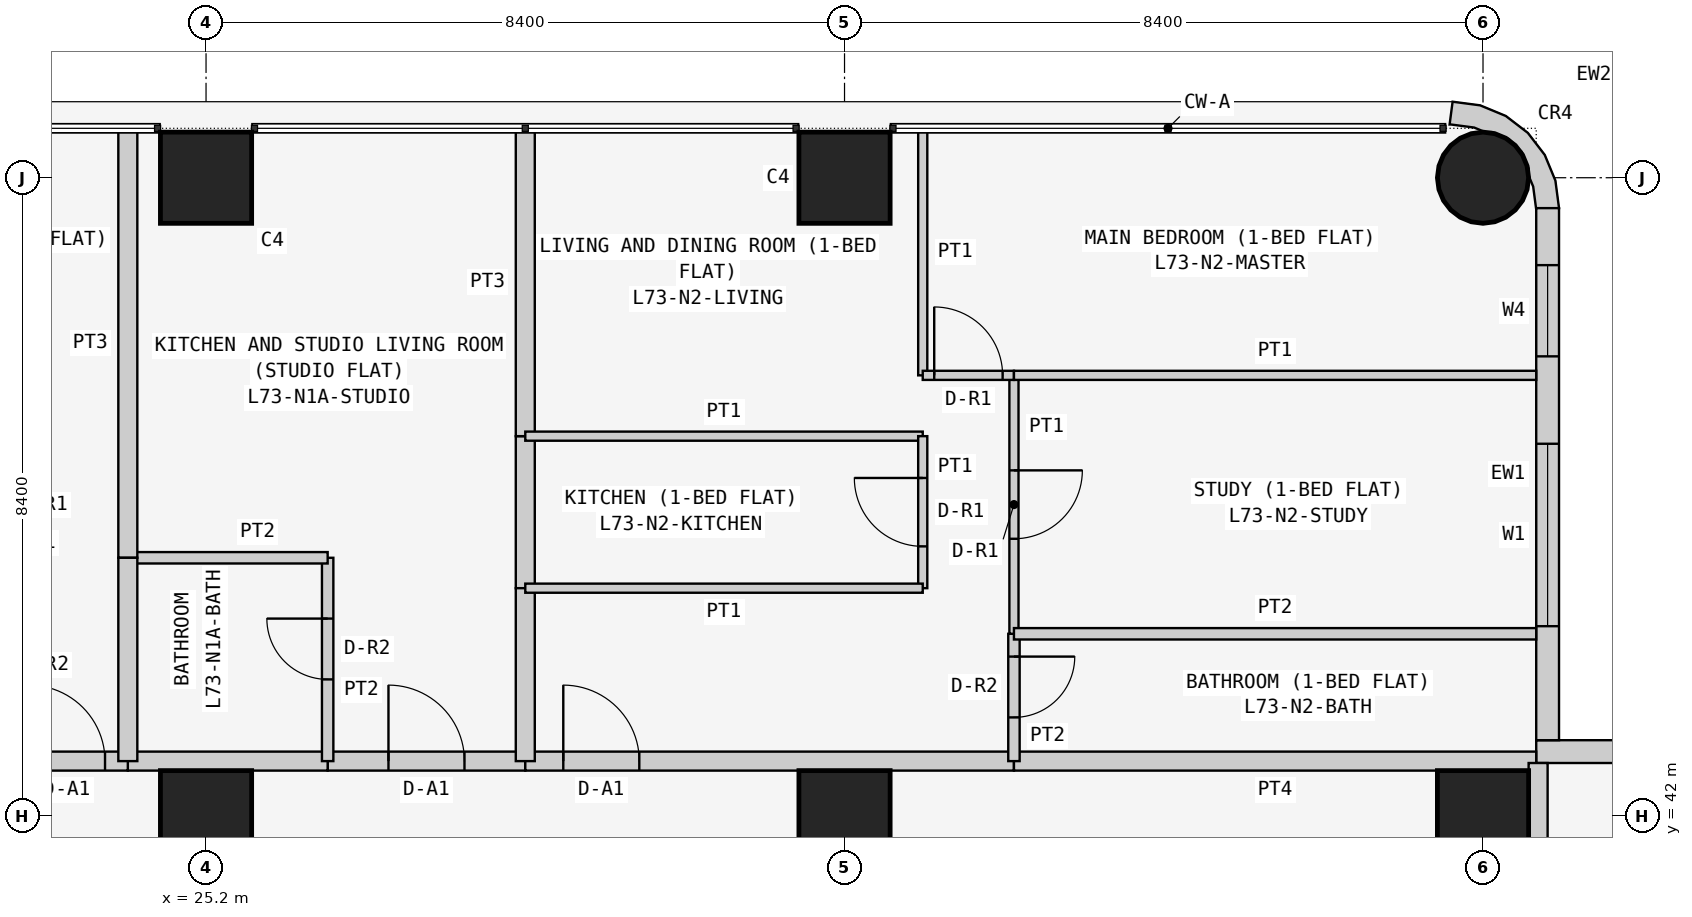
"""IFC4 building model, lengths in metres.
Left out: names, types, materials, properties, quantities, classifications, styles, units other than length and angle.
Written with IfcOpenShell. Run it as: python <this file> out.ifc"""

import sys

from ifc_helpers import new_model, si_unit, direction, frame, frame_2d, origin, origin_2d, place, context, subcontext, project, spatial, polyline, rectangle, circle, outline, extrude, element, fill, save


model = new_model("IFC4")
c1 = context("Model", 3, precision=1e-05, world=origin(), true_north=direction((0.0, 1.0)))
c2 = subcontext(c1, "Body", "Model", "MODEL_VIEW")
j1 = project(units=[si_unit("LENGTHUNIT", "METRE"), si_unit("PLANEANGLEUNIT", "RADIAN")], contexts=[c1])
p1 = place(None, origin())
s1 = spatial("IfcSite", under=j1, at=p1, CompositionType="ELEMENT")
p2 = place(p1, origin())
s2 = spatial("IfcBuilding", under=s1, at=p2, CompositionType="ELEMENT")
p3 = place(p2, frame((0.0, 0.0, 279.3)))
s3 = spatial("IfcBuildingStorey", under=s2, at=p3, CompositionType="ELEMENT", Elevation=279.3)
for number, where, z_axis, x_axis in (
    (1, (25.2, 42.0, 0.0), (0.0, 0.0, 1.0), (1.0, 0.0, 0.0)),
    (2, (25.2, 50.4, 0.0), (0.0, 0.0, 1.0), (1.0, 0.0, 0.0)),
    (3, (33.6, 42.0, 0.0), (0.0, 0.0, 1.0), (1.0, 0.0, 0.0)),
    (4, (33.6, 50.4, 0.0), (0.0, 0.0, 1.0), (1.0, 0.0, 0.0)),
    (5, (42.0, 42.0, 0.0), (0.0, 0.0, 1.0), (1.0, 0.0, 0.0)),
):
    element("IfcColumn", number, at=place(p3, frame(where, z_axis=z_axis, x_axis=x_axis)), inside=s3, PredefinedType="COLUMN", context=c2, shape_type="SweptSolid", body=[
        extrude(rectangle(XDim=1.2, YDim=1.2, at=origin_2d()), origin(), (0.0, 0.0, 1.0), 3.6),
    ])
p4 = place(p3, frame((42.0, 50.4, 0.0), z_axis=(0.0, 0.0, 1.0), x_axis=(1.0, 0.0, 0.0)))
e6 = element("IfcColumn", 6, at=p4, inside=s3, PredefinedType="COLUMN", context=c2, shape_type="SweptSolid", body=[
    extrude(circle(Radius=0.6, at=origin_2d()), origin(), (0.0, 0.0, 1.0), 3.6),
])
p5 = place(p3, frame((50.0, 42.85, 0.0), z_axis=(0.0, 0.0, 1.0), x_axis=(-1.0, 0.0, 0.0)))
e7 = element("IfcWall", 7, at=p5, inside=s3, PredefinedType="SOLIDWALL", context=c2, shape_type="SweptSolid", body=[
    extrude(rectangle(XDim=7.3, YDim=0.3, at=frame_2d((3.65, 0.0))), origin(), (0.0, 0.0, 1.0), 3.45),
])
p6 = place(p5, frame((3.1, 0.0, 0.9)))
e8 = element("IfcOpeningElement", 8, at=p6, cuts=e7, PredefinedType="OPENING", context=c2, shape_type="SweptSolid", body=[
    extrude(rectangle(XDim=2.4, YDim=1.5, at=frame_2d((1.2, 0.75))), frame((0.0, 0.16, 0.0), z_axis=(0.0, -1.0, 0.0), x_axis=(1.0, 0.0, 0.0)), (0.0, 0.0, 1.0), 0.32),
])
p7 = place(p5, frame((0.75, 0.0, 0.9)))
e9 = element("IfcOpeningElement", 9, at=p7, cuts=e7, PredefinedType="OPENING", context=c2, shape_type="SweptSolid", body=[
    extrude(rectangle(XDim=1.2, YDim=1.5, at=frame_2d((0.6, 0.75))), frame((0.0, 0.16, 0.0), z_axis=(0.0, -1.0, 0.0), x_axis=(1.0, 0.0, 0.0)), (0.0, 0.0, 1.0), 0.32),
])
p8 = place(p3, frame((42.85, 43.0, 0.0), z_axis=(0.0, 0.0, 1.0), x_axis=(0.0, 1.0, 0.0)))
e10 = element("IfcWall", 10, at=p8, inside=s3, PredefinedType="SOLIDWALL", context=c2, shape_type="SweptSolid", body=[
    extrude(rectangle(XDim=7.0, YDim=0.3, at=frame_2d((3.5, 0.0))), origin(), (0.0, 0.0, 1.0), 3.45),
])
p9 = place(p8, frame((1.5, 0.0, 0.9)))
e11 = element("IfcOpeningElement", 11, at=p9, cuts=e10, PredefinedType="OPENING", context=c2, shape_type="SweptSolid", body=[
    extrude(rectangle(XDim=2.4, YDim=1.5, at=frame_2d((1.2, 0.75))), frame((0.0, 0.16, 0.0), z_axis=(0.0, -1.0, 0.0), x_axis=(1.0, 0.0, 0.0)), (0.0, 0.0, 1.0), 0.32),
])
p10 = place(p8, frame((5.05, 0.0, 0.9)))
e12 = element("IfcOpeningElement", 12, at=p10, cuts=e10, PredefinedType="OPENING", context=c2, shape_type="SweptSolid", body=[
    extrude(rectangle(XDim=1.2, YDim=1.5, at=frame_2d((0.6, 0.75))), frame((0.0, 0.16, 0.0), z_axis=(0.0, -1.0, 0.0), x_axis=(1.0, 0.0, 0.0)), (0.0, 0.0, 1.0), 0.32),
])
p11 = place(p3, frame((42.576, 50.038, 0.0), z_axis=(0.0, 0.0, 1.0), x_axis=(0.707106781187, 0.707106781187, 0.0)))
e13 = element("IfcWall", 13, at=p11, inside=s3, PredefinedType="SOLIDWALL", context=c2, shape_type="SweptSolid", body=[
    extrude(outline(polyline([(0.233, 0.114), (0.047, -0.129), (0.033, -0.143), (0.273, -0.327), (0.495, -0.037), (0.635, 0.3), (0.683, 0.663), (0.635, 1.025), (0.495, 1.363), (0.273, 1.653), (0.033, 1.469), (0.047, 1.455), (0.233, 1.212), (0.292, 1.069), (0.358, 1.003), (0.449, 0.782), (0.449, 0.543), (0.358, 0.322), (0.292, 0.257), (0.233, 0.114)])), origin(), (0.0, 0.0, 1.0), 3.45),
])
p12 = place(p3, frame((26.8, 42.725, 0.0), z_axis=(0.0, 0.0, 1.0), x_axis=(1.0, 0.0, 0.0)))
e14 = element("IfcWall", 14, at=p12, inside=s3, PredefinedType="PARTITIONING", context=c2, shape_type="SweptSolid", body=[
    extrude(rectangle(XDim=2.6, YDim=0.25, at=frame_2d((1.3, 0.0))), origin(), (0.0, 0.0, 1.0), 3.45),
])
p13 = place(p12, frame((0.8, 0.0, 0.0)))
e15 = element("IfcOpeningElement", 15, at=p13, cuts=e14, PredefinedType="OPENING", context=c2, shape_type="SweptSolid", body=[
    extrude(rectangle(XDim=1.0, YDim=2.1, at=frame_2d((0.5, 1.05))), frame((0.0, 0.135, 0.0), z_axis=(0.0, -1.0, 0.0), x_axis=(1.0, 0.0, 0.0)), (0.0, 0.0, 1.0), 0.27),
])
p14 = place(p3, frame((24.171, 42.725, 0.0), z_axis=(0.0, 0.0, 1.0), x_axis=(1.0, 0.0, 0.0)))
e16 = element("IfcWall", 16, at=p14, inside=s3, PredefinedType="PARTITIONING", context=c2, shape_type="SweptSolid", body=[
    extrude(rectangle(XDim=2.629, YDim=0.25, at=frame_2d((1.314, 0.0))), origin(), (0.0, 0.0, 1.0), 3.45),
])
p15 = place(p3, frame((22.571, 42.725, 0.0), z_axis=(0.0, 0.0, 1.0), x_axis=(1.0, 0.0, 0.0)))
e17 = element("IfcWall", 17, at=p15, inside=s3, PredefinedType="PARTITIONING", context=c2, shape_type="SweptSolid", body=[
    extrude(rectangle(XDim=1.6, YDim=0.25, at=frame_2d((0.8, 0.0))), origin(), (0.0, 0.0, 1.0), 3.45),
])
p16 = place(p15, frame((0.3, 0.0, 0.0)))
e18 = element("IfcOpeningElement", 18, at=p16, cuts=e17, PredefinedType="OPENING", context=c2, shape_type="SweptSolid", body=[
    extrude(rectangle(XDim=1.0, YDim=2.1, at=frame_2d((0.5, 1.05))), frame((0.0, 0.135, 0.0), z_axis=(0.0, -1.0, 0.0), x_axis=(1.0, 0.0, 0.0)), (0.0, 0.0, 1.0), 0.27),
])
p17 = place(p3, frame((29.4, 42.725, 0.0), z_axis=(0.0, 0.0, 1.0), x_axis=(1.0, 0.0, 0.0)))
e19 = element("IfcWall", 19, at=p17, inside=s3, PredefinedType="PARTITIONING", context=c2, shape_type="SweptSolid", body=[
    extrude(rectangle(XDim=6.429, YDim=0.25, at=frame_2d((3.215, 0.0))), origin(), (0.0, 0.0, 1.0), 3.45),
])
p18 = place(p17, frame((0.5, 0.0, 0.0)))
e20 = element("IfcOpeningElement", 20, at=p18, cuts=e19, PredefinedType="OPENING", context=c2, shape_type="SweptSolid", body=[
    extrude(rectangle(XDim=1.0, YDim=2.1, at=frame_2d((0.5, 1.05))), frame((0.0, 0.135, 0.0), z_axis=(0.0, -1.0, 0.0), x_axis=(1.0, 0.0, 0.0)), (0.0, 0.0, 1.0), 0.27),
])
for number, where, z_axis, x_axis in (
    (21, (35.829, 42.725, 0.0), (0.0, 0.0, 1.0), (1.0, 0.0, 0.0)),
    (22, (42.725, 42.7, 0.0), (0.0, 0.0, 1.0), (0.0, -1.0, 0.0)),
):
    element("IfcWall", number, at=place(p3, frame(where, z_axis=z_axis, x_axis=x_axis)), inside=s3, PredefinedType="PARTITIONING", context=c2, shape_type="SweptSolid", body=[
        extrude(rectangle(XDim=6.871, YDim=0.25, at=frame_2d((3.436, 0.0))), origin(), (0.0, 0.0, 1.0), 3.45),
    ])
p19 = place(p3, frame((26.8, 42.725, 0.0), z_axis=(0.0, 0.0, 1.0), x_axis=(0.0, 1.0, 0.0)))
e23 = element("IfcWall", 23, at=p19, inside=s3, PredefinedType="PARTITIONING", context=c2, shape_type="SweptSolid", body=[
    extrude(rectangle(XDim=2.675, YDim=0.15, at=frame_2d((1.337, 0.0))), origin(), (0.0, 0.0, 1.0), 3.45),
])
p20 = place(p19, frame((1.075, 0.0, 0.0)))
e24 = element("IfcOpeningElement", 24, at=p20, cuts=e23, PredefinedType="OPENING", context=c2, shape_type="SweptSolid", body=[
    extrude(rectangle(XDim=0.8, YDim=2.1, at=frame_2d((0.4, 1.05))), frame((0.0, 0.085, 0.0), z_axis=(0.0, -1.0, 0.0), x_axis=(1.0, 0.0, 0.0)), (0.0, 0.0, 1.0), 0.17),
])
p21 = place(p3, frame((26.8, 45.4, 0.0), z_axis=(0.0, 0.0, 1.0), x_axis=(-1.0, 0.0, 0.0)))
e25 = element("IfcWall", 25, at=p21, inside=s3, PredefinedType="PARTITIONING", context=c2, shape_type="SweptSolid", body=[
    extrude(rectangle(XDim=2.629, YDim=0.15, at=frame_2d((1.314, 0.0))), origin(), (0.0, 0.0, 1.0), 3.45),
])
p22 = place(p3, frame((24.171, 45.4, 0.0), z_axis=(0.0, 0.0, 1.0), x_axis=(0.0, 1.0, 0.0)))
e26 = element("IfcWall", 26, at=p22, inside=s3, PredefinedType="PARTITIONING", context=c2, shape_type="SweptSolid", body=[
    extrude(rectangle(XDim=5.65, YDim=0.25, at=frame_2d((2.825, 0.0))), origin(), (0.0, 0.0, 1.0), 3.45),
])
p23 = place(p3, frame((29.4, 47.0, 0.0), z_axis=(0.0, 0.0, 1.0), x_axis=(0.0, -1.0, 0.0)))
e27 = element("IfcWall", 27, at=p23, inside=s3, PredefinedType="PARTITIONING", context=c2, shape_type="SweptSolid", body=[
    extrude(rectangle(XDim=2.0, YDim=0.25, at=frame_2d((1.0, 0.0))), origin(), (0.0, 0.0, 1.0), 2.848),
])
p24 = place(p3, frame((29.4, 45.0, 0.0), z_axis=(0.0, 0.0, 1.0), x_axis=(0.0, -1.0, 0.0)))
e28 = element("IfcWall", 28, at=p24, inside=s3, PredefinedType="PARTITIONING", context=c2, shape_type="SweptSolid", body=[
    extrude(rectangle(XDim=2.275, YDim=0.25, at=frame_2d((1.137, 0.0))), origin(), (0.0, 0.0, 1.0), 2.848),
])
p25 = place(p3, frame((29.4, 51.05, 0.0), z_axis=(0.0, 0.0, 1.0), x_axis=(0.0, -1.0, 0.0)))
e29 = element("IfcWall", 29, at=p25, inside=s3, PredefinedType="PARTITIONING", context=c2, shape_type="SweptSolid", body=[
    extrude(rectangle(XDim=4.05, YDim=0.25, at=frame_2d((2.025, 0.0))), origin(), (0.0, 0.0, 1.0), 2.848),
])
p26 = place(p3, frame((24.171, 45.4, 0.0), z_axis=(0.0, 0.0, 1.0), x_axis=(0.0, -1.0, 0.0)))
e30 = element("IfcWall", 30, at=p26, inside=s3, PredefinedType="PARTITIONING", context=c2, shape_type="SweptSolid", body=[
    extrude(rectangle(XDim=2.675, YDim=0.25, at=frame_2d((1.337, 0.0))), origin(), (0.0, 0.0, 1.0), 3.45),
])
p27 = place(p3, frame((29.4, 47.0, 0.0), z_axis=(0.0, 0.0, 1.0), x_axis=(1.0, 0.0, 0.0)))
e31 = element("IfcWall", 31, at=p27, inside=s3, PredefinedType="PARTITIONING", context=c2, shape_type="SweptSolid", body=[
    extrude(rectangle(XDim=5.229, YDim=0.12, at=frame_2d((2.615, 0.0))), origin(), (0.0, 0.0, 1.0), 3.45),
])
p28 = place(p3, frame((34.629, 47.0, 0.0), z_axis=(0.0, 0.0, 1.0), x_axis=(0.0, -1.0, 0.0)))
e32 = element("IfcWall", 32, at=p28, inside=s3, PredefinedType="PARTITIONING", context=c2, shape_type="SweptSolid", body=[
    extrude(rectangle(XDim=2.0, YDim=0.12, at=frame_2d((1.0, 0.0))), origin(), (0.0, 0.0, 1.0), 3.45),
])
p29 = place(p28, frame((0.55, 0.0, 0.0)))
e33 = element("IfcOpeningElement", 33, at=p29, cuts=e32, PredefinedType="OPENING", context=c2, shape_type="SweptSolid", body=[
    extrude(rectangle(XDim=0.9, YDim=2.1, at=frame_2d((0.45, 1.05))), frame((0.0, 0.07, 0.0), z_axis=(0.0, -1.0, 0.0), x_axis=(1.0, 0.0, 0.0)), (0.0, 0.0, 1.0), 0.14),
])
p30 = place(p3, frame((34.629, 45.0, 0.0), z_axis=(0.0, 0.0, 1.0), x_axis=(-1.0, 0.0, 0.0)))
e34 = element("IfcWall", 34, at=p30, inside=s3, PredefinedType="PARTITIONING", context=c2, shape_type="SweptSolid", body=[
    extrude(rectangle(XDim=5.229, YDim=0.12, at=frame_2d((2.615, 0.0))), origin(), (0.0, 0.0, 1.0), 3.45),
])
p31 = place(p3, frame((35.829, 44.4, 0.0), z_axis=(0.0, 0.0, 1.0), x_axis=(0.0, -1.0, 0.0)))
e35 = element("IfcWall", 35, at=p31, inside=s3, PredefinedType="PARTITIONING", context=c2, shape_type="SweptSolid", body=[
    extrude(rectangle(XDim=1.675, YDim=0.15, at=frame_2d((0.837, 0.0))), origin(), (0.0, 0.0, 1.0), 3.45),
])
p32 = place(p31, frame((0.3, 0.0, 0.0)))
e36 = element("IfcOpeningElement", 36, at=p32, cuts=e35, PredefinedType="OPENING", context=c2, shape_type="SweptSolid", body=[
    extrude(rectangle(XDim=0.8, YDim=2.1, at=frame_2d((0.4, 1.05))), frame((0.0, 0.085, 0.0), z_axis=(0.0, -1.0, 0.0), x_axis=(1.0, 0.0, 0.0)), (0.0, 0.0, 1.0), 0.17),
])
p33 = place(p3, frame((35.829, 47.8, 0.0), z_axis=(0.0, 0.0, 1.0), x_axis=(0.0, -1.0, 0.0)))
e37 = element("IfcWall", 37, at=p33, inside=s3, PredefinedType="PARTITIONING", context=c2, shape_type="SweptSolid", body=[
    extrude(rectangle(XDim=3.4, YDim=0.12, at=frame_2d((1.7, 0.0))), origin(), (0.0, 0.0, 1.0), 3.45),
])
p34 = place(p33, frame((1.25, 0.0, 0.0)))
e38 = element("IfcOpeningElement", 38, at=p34, cuts=e37, PredefinedType="OPENING", context=c2, shape_type="SweptSolid", body=[
    extrude(rectangle(XDim=0.9, YDim=2.1, at=frame_2d((0.45, 1.05))), frame((0.0, 0.07, 0.0), z_axis=(0.0, -1.0, 0.0), x_axis=(1.0, 0.0, 0.0)), (0.0, 0.0, 1.0), 0.14),
])
p35 = place(p3, frame((34.629, 51.05, 0.0), z_axis=(0.0, 0.0, 1.0), x_axis=(0.0, -1.0, 0.0)))
e39 = element("IfcWall", 39, at=p35, inside=s3, PredefinedType="PARTITIONING", context=c2, shape_type="SweptSolid", body=[
    extrude(rectangle(XDim=3.25, YDim=0.12, at=frame_2d((1.625, 0.0))), origin(), (0.0, 0.0, 1.0), 3.45),
])
p36 = place(p3, frame((34.629, 47.8, 0.0), z_axis=(0.0, 0.0, 1.0), x_axis=(1.0, 0.0, 0.0)))
e40 = element("IfcWall", 40, at=p36, inside=s3, PredefinedType="PARTITIONING", context=c2, shape_type="SweptSolid", body=[
    extrude(rectangle(XDim=1.2, YDim=0.12, at=frame_2d((0.6, 0.0))), origin(), (0.0, 0.0, 1.0), 3.45),
])
p37 = place(p36, frame((0.151, 0.0, 0.0)))
e41 = element("IfcOpeningElement", 41, at=p37, cuts=e40, PredefinedType="OPENING", context=c2, shape_type="SweptSolid", body=[
    extrude(rectangle(XDim=0.9, YDim=2.1, at=frame_2d((0.45, 1.05))), frame((0.0, 0.07, 0.0), z_axis=(0.0, -1.0, 0.0), x_axis=(1.0, 0.0, 0.0)), (0.0, 0.0, 1.0), 0.14),
])
p38 = place(p3, frame((35.829, 44.4, 0.0), z_axis=(0.0, 0.0, 1.0), x_axis=(1.0, 0.0, 0.0)))
e42 = element("IfcWall", 42, at=p38, inside=s3, PredefinedType="PARTITIONING", context=c2, shape_type="SweptSolid", body=[
    extrude(rectangle(XDim=6.871, YDim=0.15, at=frame_2d((3.436, 0.0))), origin(), (0.0, 0.0, 1.0), 3.45),
])
p39 = place(p3, frame((35.829, 47.8, 0.0), z_axis=(0.0, 0.0, 1.0), x_axis=(1.0, 0.0, 0.0)))
e43 = element("IfcWall", 43, at=p39, inside=s3, PredefinedType="PARTITIONING", context=c2, shape_type="SweptSolid", body=[
    extrude(rectangle(XDim=6.871, YDim=0.12, at=frame_2d((3.436, 0.0))), origin(), (0.0, 0.0, 1.0), 3.45),
])
p40 = place(p9, origin())
e44 = element("IfcWindow", 44, at=p40, inside=s3, PartitioningType="SINGLE_PANEL", PredefinedType="WINDOW", context=c2, shape_type="SweptSolid", body=[
    extrude(rectangle(XDim=2.4, YDim=1.5, at=frame_2d((1.2, 0.75))), frame((0.0, 0.03, 0.0), z_axis=(0.0, -1.0, 0.0), x_axis=(1.0, 0.0, 0.0)), (0.0, 0.0, 1.0), 0.06),
])
fill(e11, e44)
p41 = place(p10, origin())
e45 = element("IfcWindow", 45, at=p41, inside=s3, PartitioningType="SINGLE_PANEL", PredefinedType="WINDOW", context=c2, shape_type="SweptSolid", body=[
    extrude(rectangle(XDim=1.2, YDim=1.5, at=frame_2d((0.6, 0.75))), frame((0.0, 0.03, 0.0), z_axis=(0.0, -1.0, 0.0), x_axis=(1.0, 0.0, 0.0)), (0.0, 0.0, 1.0), 0.06),
])
fill(e12, e45)
p42 = place(p13, origin())
e46 = element("IfcDoor", 46, at=p42, inside=s3, OperationType="SINGLE_SWING_LEFT", PredefinedType="DOOR", context=c2, shape_type="SweptSolid", body=[
    extrude(rectangle(XDim=1.0, YDim=2.1, at=frame_2d((0.5, 1.05))), frame((0.0, 0.025, 0.0), z_axis=(0.0, -1.0, 0.0), x_axis=(1.0, 0.0, 0.0)), (0.0, 0.0, 1.0), 0.05),
])
fill(e15, e46)
p43 = place(p20, origin())
e47 = element("IfcDoor", 47, at=p43, inside=s3, OperationType="SINGLE_SWING_RIGHT", PredefinedType="DOOR", context=c2, shape_type="SweptSolid", body=[
    extrude(rectangle(XDim=0.8, YDim=2.1, at=frame_2d((0.4, 1.05))), frame((0.0, 0.025, 0.0), z_axis=(0.0, -1.0, 0.0), x_axis=(1.0, 0.0, 0.0)), (0.0, 0.0, 1.0), 0.05),
])
fill(e24, e47)
p44 = place(p16, origin())
e48 = element("IfcDoor", 48, at=p44, inside=s3, OperationType="SINGLE_SWING_LEFT", PredefinedType="DOOR", context=c2, shape_type="SweptSolid", body=[
    extrude(rectangle(XDim=1.0, YDim=2.1, at=frame_2d((0.5, 1.05))), frame((0.0, 0.025, 0.0), z_axis=(0.0, -1.0, 0.0), x_axis=(1.0, 0.0, 0.0)), (0.0, 0.0, 1.0), 0.05),
])
fill(e18, e48)
p45 = place(p18, origin())
e49 = element("IfcDoor", 49, at=p45, inside=s3, OperationType="SINGLE_SWING_LEFT", PredefinedType="DOOR", context=c2, shape_type="SweptSolid", body=[
    extrude(rectangle(XDim=1.0, YDim=2.1, at=frame_2d((0.5, 1.05))), frame((0.0, 0.025, 0.0), z_axis=(0.0, -1.0, 0.0), x_axis=(1.0, 0.0, 0.0)), (0.0, 0.0, 1.0), 0.05),
])
fill(e20, e49)
p46 = place(p29, frame((0.9, 0.0, 0.0), z_axis=(0.0, 0.0, 1.0), x_axis=(-1.0, 0.0, 0.0)))
e50 = element("IfcDoor", 50, at=p46, inside=s3, OperationType="SINGLE_SWING_RIGHT", PredefinedType="DOOR", context=c2, shape_type="SweptSolid", body=[
    extrude(rectangle(XDim=0.9, YDim=2.1, at=frame_2d((0.45, 1.05))), frame((0.0, 0.025, 0.0), z_axis=(0.0, -1.0, 0.0), x_axis=(1.0, 0.0, 0.0)), (0.0, 0.0, 1.0), 0.05),
])
fill(e33, e50)
p47 = place(p32, origin())
e51 = element("IfcDoor", 51, at=p47, inside=s3, OperationType="SINGLE_SWING_LEFT", PredefinedType="DOOR", context=c2, shape_type="SweptSolid", body=[
    extrude(rectangle(XDim=0.8, YDim=2.1, at=frame_2d((0.4, 1.05))), frame((0.0, 0.025, 0.0), z_axis=(0.0, -1.0, 0.0), x_axis=(1.0, 0.0, 0.0)), (0.0, 0.0, 1.0), 0.05),
])
fill(e36, e51)
p48 = place(p34, origin())
e52 = element("IfcDoor", 52, at=p48, inside=s3, OperationType="SINGLE_SWING_LEFT", PredefinedType="DOOR", context=c2, shape_type="SweptSolid", body=[
    extrude(rectangle(XDim=0.9, YDim=2.1, at=frame_2d((0.45, 1.05))), frame((0.0, 0.025, 0.0), z_axis=(0.0, -1.0, 0.0), x_axis=(1.0, 0.0, 0.0)), (0.0, 0.0, 1.0), 0.05),
])
fill(e38, e52)
p49 = place(p37, origin())
e53 = element("IfcDoor", 53, at=p49, inside=s3, OperationType="SINGLE_SWING_LEFT", PredefinedType="DOOR", context=c2, shape_type="SweptSolid", body=[
    extrude(rectangle(XDim=0.9, YDim=2.1, at=frame_2d((0.45, 1.05))), frame((0.0, 0.025, 0.0), z_axis=(0.0, -1.0, 0.0), x_axis=(1.0, 0.0, 0.0)), (0.0, 0.0, 1.0), 0.05),
])
fill(e41, e53)
save(model, sys.argv[1])
